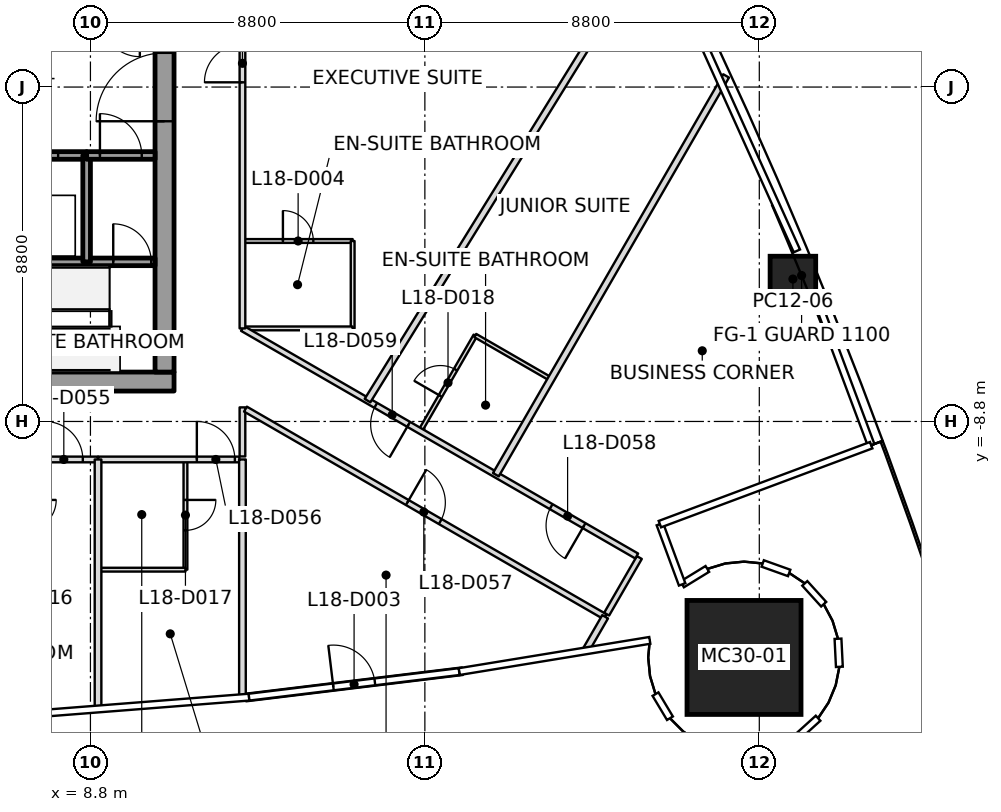
"""IFC4 building model, lengths in metres.
Left out: names, types, materials, properties, quantities, classifications, styles, units other than length and angle.
Written with IfcOpenShell. Run it as: python <this file> out.ifc"""

import sys

from ifc_helpers import new_model, si_unit, direction, frame, frame_2d, origin, origin_2d, place, context, subcontext, project, spatial, rectangle, extrude, element, fill, save


model = new_model("IFC4")
c1 = context("Model", 3, precision=1e-05, world=origin(), true_north=direction((0.0, 1.0)))
c2 = subcontext(c1, "Body", "Model", "MODEL_VIEW")
j1 = project(units=[si_unit("LENGTHUNIT", "METRE"), si_unit("PLANEANGLEUNIT", "RADIAN")], contexts=[c1])
p1 = place(None, origin())
s1 = spatial("IfcSite", under=j1, at=p1, CompositionType="ELEMENT")
p2 = place(p1, origin())
s2 = spatial("IfcBuilding", under=s1, at=p2, CompositionType="ELEMENT")
p3 = place(p2, frame((0.0, 0.0, 88.7)))
s3 = spatial("IfcBuildingStorey", under=s2, at=p3, CompositionType="ELEMENT", Elevation=88.7)
p4 = place(p3, frame((25.998, -15.01, 0.0), z_axis=(-0.030466109479, 0.017607037296, 0.999380712447), x_axis=(0.999535800346, 0.000536667047, 0.03046138236)))
e1 = element("IfcColumn", 1, at=p4, inside=s3, PredefinedType="COLUMN", context=c2, shape_type="SweptSolid", body=[
    extrude(rectangle(XDim=3.0, YDim=3.0, at=origin_2d()), origin(), (0.0, 0.0, 1.0), 3.702),
])
p5 = place(p3, frame((27.284, -5.052, 0.0), z_axis=(-0.019460669214, 0.010950749456, 0.999750650632), x_axis=(-0.380819123517, 0.924483192548, -0.017539152187)))
e2 = element("IfcColumn", 2, at=p5, inside=s3, PredefinedType="COLUMN", context=c2, shape_type="SweptSolid", body=[
    extrude(rectangle(XDim=1.2, YDim=1.2, at=origin_2d()), origin(), (0.0, 0.0, 1.0), 3.701),
])
p6 = place(p3, frame((-11.0, -7.75, 0.0), z_axis=(0.0, 0.0, 1.0), x_axis=(1.0, 0.0, 0.0)))
e3 = element("IfcWall", 3, at=p6, inside=s3, PredefinedType="SHEAR", context=c2, shape_type="SweptSolid", body=[
    extrude(rectangle(XDim=22.0, YDim=0.5, at=frame_2d((11.0, 0.0))), origin(), (0.0, 0.0, 1.0), 3.7),
])
p7 = place(p6, frame((10.45, 0.0, 0.0)))
e4 = element("IfcOpeningElement", 4, at=p7, cuts=e3, PredefinedType="OPENING", context=c2, shape_type="SweptSolid", body=[
    extrude(rectangle(XDim=1.1, YDim=2.1, at=frame_2d((0.55, 1.05))), frame((0.0, 0.25, 0.0), z_axis=(0.0, -1.0, 0.0), x_axis=(1.0, 0.0, 0.0)), (0.0, 0.0, 1.0), 0.5),
])
p8 = place(p3, frame((10.75, -7.5, 0.0), z_axis=(0.0, 0.0, 1.0), x_axis=(0.0, 1.0, 0.0)))
e5 = element("IfcWall", 5, at=p8, inside=s3, PredefinedType="SHEAR", context=c2, shape_type="SweptSolid", body=[
    extrude(rectangle(XDim=15.0, YDim=0.5, at=frame_2d((7.5, 0.0))), origin(), (0.0, 0.0, 1.0), 3.7),
])
p9 = place(p8, frame((6.6, 0.0, 0.0)))
e6 = element("IfcOpeningElement", 6, at=p9, cuts=e5, PredefinedType="OPENING", context=c2, shape_type="SweptSolid", body=[
    extrude(rectangle(XDim=1.8, YDim=2.1, at=frame_2d((0.9, 1.05))), frame((0.0, 0.25, 0.0), z_axis=(0.0, -1.0, 0.0), x_axis=(1.0, 0.0, 0.0)), (0.0, 0.0, 1.0), 0.5),
])
p10 = place(p3, frame((12.884, -16.065, 0.0), z_axis=(0.0, 0.0, 1.0), x_axis=(0.992689748885, 0.12069408626, 0.0)))
e7 = element("IfcWall", 7, at=p10, inside=s3, PredefinedType="SOLIDWALL", context=c2, shape_type="SweptSolid", body=[
    extrude(rectangle(XDim=5.749, YDim=0.2, at=frame_2d((2.875, 0.0))), origin(), (0.0, 0.0, 1.0), 3.04),
])
p11 = place(p10, frame((2.324, 0.0, 0.0)))
e8 = element("IfcOpeningElement", 8, at=p11, cuts=e7, PredefinedType="OPENING", context=c2, shape_type="SweptSolid", body=[
    extrude(rectangle(XDim=1.1, YDim=2.1, at=frame_2d((0.55, 1.05))), frame((0.0, 0.1, 0.0), z_axis=(0.0, -1.0, 0.0), x_axis=(1.0, 0.0, 0.0)), (0.0, 0.0, 1.0), 0.2),
])
p12 = place(p3, frame((6.1, -4.6, 0.0), z_axis=(0.0, 0.0, 1.0), x_axis=(1.0, 0.0, 0.0)))
e9 = element("IfcWall", 9, at=p12, inside=s3, PredefinedType="SOLIDWALL", context=c2, shape_type="SweptSolid", body=[
    extrude(rectangle(XDim=2.6, YDim=0.2, at=frame_2d((1.3, 0.0))), origin(), (0.0, 0.0, 1.0), 3.55),
])
p13 = place(p3, frame((6.1, -1.8, 0.0), z_axis=(0.0, 0.0, 1.0), x_axis=(1.0, 0.0, 0.0)))
e10 = element("IfcWall", 10, at=p13, inside=s3, PredefinedType="SOLIDWALL", context=c2, shape_type="SweptSolid", body=[
    extrude(rectangle(XDim=2.6, YDim=0.2, at=frame_2d((1.3, 0.0))), origin(), (0.0, 0.0, 1.0), 3.55),
])
p14 = place(p13, frame((0.75, 0.0, 0.0)))
e11 = element("IfcOpeningElement", 11, at=p14, cuts=e10, PredefinedType="OPENING", context=c2, shape_type="SweptSolid", body=[
    extrude(rectangle(XDim=1.1, YDim=2.1, at=frame_2d((0.55, 1.05))), frame((0.0, 0.1, 0.0), z_axis=(0.0, -1.0, 0.0), x_axis=(1.0, 0.0, 0.0)), (0.0, 0.0, 1.0), 0.2),
])
p15 = place(p3, frame((8.7, -4.6, 0.0), z_axis=(0.0, 0.0, 1.0), x_axis=(1.0, 0.0, 0.0)))
e12 = element("IfcWall", 12, at=p15, inside=s3, PredefinedType="SOLIDWALL", context=c2, shape_type="SweptSolid", body=[
    extrude(rectangle(XDim=1.8, YDim=0.2, at=frame_2d((0.9, 0.0))), origin(), (0.0, 0.0, 1.0), 3.55),
])
p16 = place(p15, frame((0.7, 0.0, 0.0)))
e13 = element("IfcOpeningElement", 13, at=p16, cuts=e12, PredefinedType="OPENING", context=c2, shape_type="SweptSolid", body=[
    extrude(rectangle(XDim=1.0, YDim=2.1, at=frame_2d((0.5, 1.05))), frame((0.0, 0.1, 0.0), z_axis=(0.0, -1.0, 0.0), x_axis=(1.0, 0.0, 0.0)), (0.0, 0.0, 1.0), 0.2),
])
p17 = place(p3, frame((8.7, -1.8, 0.0), z_axis=(0.0, 0.0, 1.0), x_axis=(0.0, -1.0, 0.0)))
e14 = element("IfcWall", 14, at=p17, inside=s3, PredefinedType="SOLIDWALL", context=c2, shape_type="SweptSolid", body=[
    extrude(rectangle(XDim=2.8, YDim=0.2, at=frame_2d((1.4, 0.0))), origin(), (0.0, 0.0, 1.0), 3.55),
])
p18 = place(p3, frame((8.7, -1.8, 0.0), z_axis=(0.0, 0.0, 1.0), x_axis=(1.0, 0.0, 0.0)))
e15 = element("IfcWall", 15, at=p18, inside=s3, PredefinedType="SOLIDWALL", context=c2, shape_type="SweptSolid", body=[
    extrude(rectangle(XDim=1.8, YDim=0.2, at=frame_2d((0.9, 0.0))), origin(), (0.0, 0.0, 1.0), 3.55),
])
p19 = place(p18, frame((0.35, 0.0, 0.0)))
e16 = element("IfcOpeningElement", 16, at=p19, cuts=e15, PredefinedType="OPENING", context=c2, shape_type="SweptSolid", body=[
    extrude(rectangle(XDim=1.1, YDim=2.1, at=frame_2d((0.55, 1.05))), frame((0.0, 0.1, 0.0), z_axis=(0.0, -1.0, 0.0), x_axis=(1.0, 0.0, 0.0)), (0.0, 0.0, 1.0), 0.2),
])
p20 = place(p3, frame((9.0, -9.8, 0.0), z_axis=(0.0, 0.0, 1.0), x_axis=(0.0, -1.0, 0.0)))
e17 = element("IfcWall", 17, at=p20, inside=s3, PredefinedType="PARTITIONING", context=c2, shape_type="SweptSolid", body=[
    extrude(rectangle(XDim=6.589, YDim=0.175, at=frame_2d((3.294, 0.0))), origin(), (0.0, 0.0, 1.0), 3.15),
])
p21 = place(p3, frame((12.8, -9.8, 0.0), z_axis=(0.0, 0.0, 1.0), x_axis=(0.0, -1.0, 0.0)))
e18 = element("IfcWall", 18, at=p21, inside=s3, PredefinedType="PARTITIONING", context=c2, shape_type="SweptSolid", body=[
    extrude(rectangle(XDim=6.271, YDim=0.175, at=frame_2d((3.135, 0.0))), origin(), (0.0, 0.0, 1.0), 3.15),
])
p22 = place(p3, frame((23.572, 3.843, 0.0), z_axis=(0.0, 0.0, 1.0), x_axis=(-0.526072077188, -0.850439985891, 0.0)))
e19 = element("IfcWall", 19, at=p22, inside=s3, PredefinedType="PARTITIONING", context=c2, shape_type="SweptSolid", body=[
    extrude(rectangle(XDim=14.221, YDim=0.175, at=frame_2d((7.11, 0.0))), origin(), (0.0, 0.0, 1.0), 2.947),
])
p23 = place(p3, frame((25.527, 0.293, 0.0), z_axis=(0.0, 0.0, 1.0), x_axis=(-0.499987549055, -0.866032592222, 0.0)))
e20 = element("IfcWall", 20, at=p23, inside=s3, PredefinedType="PARTITIONING", context=c2, shape_type="SweptSolid", body=[
    extrude(rectangle(XDim=12.117, YDim=0.175, at=frame_2d((6.059, 0.0))), origin(), (0.0, 0.0, 1.0), 2.934),
])
p24 = place(p3, frame((22.344, -13.939, 0.0), z_axis=(0.0, 0.0, 1.0), x_axis=(-0.499980071345, -0.866036909293, 0.0)))
e21 = element("IfcWall", 21, at=p24, inside=s3, PredefinedType="PARTITIONING", context=c2, shape_type="SweptSolid", body=[
    extrude(rectangle(XDim=1.066, YDim=0.175, at=frame_2d((0.533, 0.0))), origin(), (0.0, 0.0, 1.0), 3.15),
])
p25 = place(p3, frame((5.1, -9.8, 0.0), z_axis=(0.0, 0.0, 1.0), x_axis=(1.0, 0.0, 0.0)))
e22 = element("IfcWall", 22, at=p25, inside=s3, PredefinedType="PARTITIONING", context=c2, shape_type="SweptSolid", body=[
    extrude(rectangle(XDim=3.9, YDim=0.15, at=frame_2d((1.95, 0.0))), origin(), (0.0, 0.0, 1.0), 3.15),
])
p26 = place(p25, frame((2.5, 0.0, 0.0)))
e23 = element("IfcOpeningElement", 23, at=p26, cuts=e22, PredefinedType="OPENING", context=c2, shape_type="SweptSolid", body=[
    extrude(rectangle(XDim=1.0, YDim=2.1, at=frame_2d((0.5, 1.05))), frame((0.0, 0.075, 0.0), z_axis=(0.0, -1.0, 0.0), x_axis=(1.0, 0.0, 0.0)), (0.0, 0.0, 1.0), 0.15),
])
p27 = place(p3, frame((9.0, -9.8, 0.0), z_axis=(0.0, 0.0, 1.0), x_axis=(1.0, 0.0, 0.0)))
e24 = element("IfcWall", 24, at=p27, inside=s3, PredefinedType="PARTITIONING", context=c2, shape_type="SweptSolid", body=[
    extrude(rectangle(XDim=3.72, YDim=0.15, at=frame_2d((1.86, 0.0))), origin(), (0.0, 0.0, 1.0), 3.017),
])
p28 = place(p27, frame((2.6, 0.0, 0.0)))
e25 = element("IfcOpeningElement", 25, at=p28, cuts=e24, PredefinedType="OPENING", context=c2, shape_type="SweptSolid", body=[
    extrude(rectangle(XDim=1.0, YDim=2.1, at=frame_2d((0.5, 1.05))), frame((0.0, 0.075, 0.0), z_axis=(0.0, -1.0, 0.0), x_axis=(1.0, 0.0, 0.0)), (0.0, 0.0, 1.0), 0.15),
])
p29 = place(p3, frame((12.8, -9.72, 0.0), z_axis=(0.0, 0.0, 1.0), x_axis=(0.0, 1.0, 0.0)))
e26 = element("IfcWall", 26, at=p29, inside=s3, PredefinedType="PARTITIONING", context=c2, shape_type="SweptSolid", body=[
    extrude(rectangle(XDim=1.291, YDim=0.15, at=frame_2d((0.646, 0.0))), origin(), (0.0, 0.0, 1.0), 2.797),
])
p30 = place(p3, frame((12.879, -8.475, 0.0), z_axis=(0.0, 0.0, 1.0), x_axis=(0.866025241123, -0.500000281738, 0.0)))
e27 = element("IfcWall", 27, at=p30, inside=s3, PredefinedType="PARTITIONING", context=c2, shape_type="SweptSolid", body=[
    extrude(rectangle(XDim=10.928, YDim=0.15, at=frame_2d((5.464, 0.0))), origin(), (0.0, 0.0, 1.0), 2.797),
])
p31 = place(p30, frame((4.918, 0.0, 0.0)))
e28 = element("IfcOpeningElement", 28, at=p31, cuts=e27, PredefinedType="OPENING", context=c2, shape_type="SweptSolid", body=[
    extrude(rectangle(XDim=1.0, YDim=2.1, at=frame_2d((0.5, 1.05))), frame((0.0, 0.075, 0.0), z_axis=(0.0, -1.0, 0.0), x_axis=(1.0, 0.0, 0.0)), (0.0, 0.0, 1.0), 0.15),
])
p32 = place(p3, frame((22.384, -13.87, 0.0), z_axis=(0.0, 0.0, 1.0), x_axis=(0.499894466757, 0.866086324858, 0.0)))
e29 = element("IfcWall", 29, at=p32, inside=s3, PredefinedType="PARTITIONING", context=c2, shape_type="SweptSolid", body=[
    extrude(rectangle(XDim=1.72, YDim=0.15, at=frame_2d((0.86, 0.0))), origin(), (0.0, 0.0, 1.0), 2.797),
])
p33 = place(p3, frame((23.174, -12.34, 0.0), z_axis=(0.0, 0.0, 1.0), x_axis=(-0.866028448298, 0.49999472671, 0.0)))
e30 = element("IfcWall", 30, at=p33, inside=s3, PredefinedType="PARTITIONING", context=c2, shape_type="SweptSolid", body=[
    extrude(rectangle(XDim=11.979, YDim=0.15, at=frame_2d((5.99, 0.0))), origin(), (0.0, 0.0, 1.0), 2.947),
])
p34 = place(p33, frame((1.6, 0.0, 0.0)))
e31 = element("IfcOpeningElement", 31, at=p34, cuts=e30, PredefinedType="OPENING", context=c2, shape_type="SweptSolid", body=[
    extrude(rectangle(XDim=1.0, YDim=2.1, at=frame_2d((0.5, 1.05))), frame((0.0, 0.075, 0.0), z_axis=(0.0, -1.0, 0.0), x_axis=(1.0, 0.0, 0.0)), (0.0, 0.0, 1.0), 0.15),
])
p35 = place(p33, frame((6.929, 0.0, 0.0)))
e32 = element("IfcOpeningElement", 32, at=p35, cuts=e30, PredefinedType="OPENING", context=c2, shape_type="SweptSolid", body=[
    extrude(rectangle(XDim=1.0, YDim=2.1, at=frame_2d((0.5, 1.05))), frame((0.0, 0.075, 0.0), z_axis=(0.0, -1.0, 0.0), x_axis=(1.0, 0.0, 0.0)), (0.0, 0.0, 1.0), 0.15),
])
p36 = place(p3, frame((12.8, -6.351, 0.0), z_axis=(0.0, 0.0, 1.0), x_axis=(0.0, 1.0, 0.0)))
e33 = element("IfcWall", 33, at=p36, inside=s3, PredefinedType="PARTITIONING", context=c2, shape_type="SweptSolid", body=[
    extrude(rectangle(XDim=16.071, YDim=0.15, at=frame_2d((8.035, 0.0))), origin(), (0.0, 0.0, 1.0), 2.947),
])
p37 = place(p36, frame((6.476, 0.0, 0.0)))
e34 = element("IfcOpeningElement", 34, at=p37, cuts=e33, PredefinedType="OPENING", context=c2, shape_type="SweptSolid", body=[
    extrude(rectangle(XDim=1.0, YDim=2.1, at=frame_2d((0.5, 1.05))), frame((0.0, 0.075, 0.0), z_axis=(0.0, -1.0, 0.0), x_axis=(1.0, 0.0, 0.0)), (0.0, 0.0, 1.0), 0.15),
])
p38 = place(p36, frame((13.351, 0.0, 0.0)))
e35 = element("IfcOpeningElement", 35, at=p38, cuts=e33, PredefinedType="OPENING", context=c2, shape_type="SweptSolid", body=[
    extrude(rectangle(XDim=1.0, YDim=2.1, at=frame_2d((0.5, 1.05))), frame((0.0, 0.075, 0.0), z_axis=(0.0, -1.0, 0.0), x_axis=(1.0, 0.0, 0.0)), (0.0, 0.0, 1.0), 0.15),
])
p39 = place(p3, frame((11.3, -9.83, 0.0), z_axis=(0.0, 0.0, 1.0), x_axis=(0.0, -1.0, 0.0)))
e36 = element("IfcWall", 36, at=p39, inside=s3, PredefinedType="PARTITIONING", context=c2, shape_type="SweptSolid", body=[
    extrude(rectangle(XDim=2.87, YDim=0.1, at=frame_2d((1.435, 0.0))), origin(), (0.0, 0.0, 1.0), 3.017),
])
p40 = place(p39, frame((1.035, 0.0, 0.0)))
e37 = element("IfcOpeningElement", 37, at=p40, cuts=e36, PredefinedType="OPENING", context=c2, shape_type="SweptSolid", body=[
    extrude(rectangle(XDim=0.8, YDim=2.1, at=frame_2d((0.4, 1.05))), frame((0.0, 0.05, 0.0), z_axis=(0.0, -1.0, 0.0), x_axis=(1.0, 0.0, 0.0)), (0.0, 0.0, 1.0), 0.1),
])
p41 = place(p3, frame((11.3, -12.7, 0.0), z_axis=(0.0, 0.0, 1.0), x_axis=(-1.0, 0.0, 0.0)))
e38 = element("IfcWall", 38, at=p41, inside=s3, PredefinedType="PARTITIONING", context=c2, shape_type="SweptSolid", body=[
    extrude(rectangle(XDim=2.27, YDim=0.1, at=frame_2d((1.135, 0.0))), origin(), (0.0, 0.0, 1.0), 3.017),
])
p42 = place(p3, frame((12.83, -4.051, 0.0), z_axis=(0.0, 0.0, 1.0), x_axis=(1.0, 0.0, 0.0)))
e39 = element("IfcWall", 39, at=p42, inside=s3, PredefinedType="PARTITIONING", context=c2, shape_type="SweptSolid", body=[
    extrude(rectangle(XDim=2.87, YDim=0.1, at=frame_2d((1.435, 0.0))), origin(), (0.0, 0.0, 1.0), 2.947),
])
p43 = place(p42, frame((1.035, 0.0, 0.0)))
e40 = element("IfcOpeningElement", 40, at=p43, cuts=e39, PredefinedType="OPENING", context=c2, shape_type="SweptSolid", body=[
    extrude(rectangle(XDim=0.8, YDim=2.1, at=frame_2d((0.4, 1.05))), frame((0.0, 0.05, 0.0), z_axis=(0.0, -1.0, 0.0), x_axis=(1.0, 0.0, 0.0)), (0.0, 0.0, 1.0), 0.1),
])
p44 = place(p3, frame((15.7, -4.051, 0.0), z_axis=(0.0, 0.0, 1.0), x_axis=(0.0, -1.0, 0.0)))
e41 = element("IfcWall", 41, at=p44, inside=s3, PredefinedType="PARTITIONING", context=c2, shape_type="SweptSolid", body=[
    extrude(rectangle(XDim=2.3, YDim=0.1, at=frame_2d((1.15, 0.0))), origin(), (0.0, 0.0, 1.0), 2.947),
])
p45 = place(p3, frame((15.7, -6.351, 0.0), z_axis=(0.0, 0.0, 1.0), x_axis=(-1.0, 0.0, 0.0)))
e42 = element("IfcWall", 42, at=p45, inside=s3, PredefinedType="PARTITIONING", context=c2, shape_type="SweptSolid", body=[
    extrude(rectangle(XDim=2.84, YDim=0.1, at=frame_2d((1.42, 0.0))), origin(), (0.0, 0.0, 1.0), 3.15),
])
p46 = place(p3, frame((17.491, -9.025, 0.0), z_axis=(0.0, 0.0, 1.0), x_axis=(0.499999802827, 0.866025517622, 0.0)))
e43 = element("IfcWall", 43, at=p46, inside=s3, PredefinedType="PARTITIONING", context=c2, shape_type="SweptSolid", body=[
    extrude(rectangle(XDim=2.87, YDim=0.1, at=frame_2d((1.435, 0.0))), origin(), (0.0, 0.0, 1.0), 3.15),
])
p47 = place(p46, frame((1.035, 0.0, 0.0)))
e44 = element("IfcOpeningElement", 44, at=p47, cuts=e43, PredefinedType="OPENING", context=c2, shape_type="SweptSolid", body=[
    extrude(rectangle(XDim=0.8, YDim=2.1, at=frame_2d((0.4, 1.05))), frame((0.0, 0.05, 0.0), z_axis=(0.0, -1.0, 0.0), x_axis=(1.0, 0.0, 0.0)), (0.0, 0.0, 1.0), 0.1),
])
p48 = place(p3, frame((18.927, -6.539, 0.0), z_axis=(0.0, 0.0, 1.0), x_axis=(0.866017224141, -0.500014167291, 0.0)))
e45 = element("IfcWall", 45, at=p48, inside=s3, PredefinedType="PARTITIONING", context=c2, shape_type="SweptSolid", body=[
    extrude(rectangle(XDim=2.27, YDim=0.1, at=frame_2d((1.135, 0.0))), origin(), (0.0, 0.0, 1.0), 3.15),
])
p49 = place(p11, origin())
e46 = element("IfcDoor", 46, at=p49, inside=s3, OperationType="SINGLE_SWING_RIGHT", PredefinedType="DOOR", context=c2, shape_type="SweptSolid", body=[
    extrude(rectangle(XDim=1.1, YDim=2.1, at=frame_2d((0.55, 1.05))), frame((0.0, 0.025, 0.0), z_axis=(0.0, -1.0, 0.0), x_axis=(1.0, 0.0, 0.0)), (0.0, 0.0, 1.0), 0.05),
])
fill(e8, e46)
p50 = place(p37, origin())
e47 = element("IfcDoor", 47, at=p50, inside=s3, OperationType="SINGLE_SWING_LEFT", PredefinedType="DOOR", context=c2, shape_type="SweptSolid", body=[
    extrude(rectangle(XDim=1.0, YDim=2.1, at=frame_2d((0.5, 1.05))), frame((0.0, 0.025, 0.0), z_axis=(0.0, -1.0, 0.0), x_axis=(1.0, 0.0, 0.0)), (0.0, 0.0, 1.0), 0.05),
])
fill(e34, e47)
p51 = place(p43, origin())
e48 = element("IfcDoor", 48, at=p51, inside=s3, OperationType="SINGLE_SWING_RIGHT", PredefinedType="DOOR", context=c2, shape_type="SweptSolid", body=[
    extrude(rectangle(XDim=0.8, YDim=2.1, at=frame_2d((0.4, 1.05))), frame((0.0, 0.025, 0.0), z_axis=(0.0, -1.0, 0.0), x_axis=(1.0, 0.0, 0.0)), (0.0, 0.0, 1.0), 0.05),
])
fill(e40, e48)
p52 = place(p26, origin())
e49 = element("IfcDoor", 49, at=p52, inside=s3, OperationType="SINGLE_SWING_LEFT", PredefinedType="DOOR", context=c2, shape_type="SweptSolid", body=[
    extrude(rectangle(XDim=1.0, YDim=2.1, at=frame_2d((0.5, 1.05))), frame((0.0, 0.025, 0.0), z_axis=(0.0, -1.0, 0.0), x_axis=(1.0, 0.0, 0.0)), (0.0, 0.0, 1.0), 0.05),
])
fill(e23, e49)
p53 = place(p28, origin())
e50 = element("IfcDoor", 50, at=p53, inside=s3, OperationType="SINGLE_SWING_LEFT", PredefinedType="DOOR", context=c2, shape_type="SweptSolid", body=[
    extrude(rectangle(XDim=1.0, YDim=2.1, at=frame_2d((0.5, 1.05))), frame((0.0, 0.025, 0.0), z_axis=(0.0, -1.0, 0.0), x_axis=(1.0, 0.0, 0.0)), (0.0, 0.0, 1.0), 0.05),
])
fill(e25, e50)
p54 = place(p40, origin())
e51 = element("IfcDoor", 51, at=p54, inside=s3, OperationType="SINGLE_SWING_RIGHT", PredefinedType="DOOR", context=c2, shape_type="SweptSolid", body=[
    extrude(rectangle(XDim=0.8, YDim=2.1, at=frame_2d((0.4, 1.05))), frame((0.0, 0.025, 0.0), z_axis=(0.0, -1.0, 0.0), x_axis=(1.0, 0.0, 0.0)), (0.0, 0.0, 1.0), 0.05),
])
fill(e37, e51)
p55 = place(p31, origin())
e52 = element("IfcDoor", 52, at=p55, inside=s3, OperationType="SINGLE_SWING_RIGHT", PredefinedType="DOOR", context=c2, shape_type="SweptSolid", body=[
    extrude(rectangle(XDim=1.0, YDim=2.1, at=frame_2d((0.5, 1.05))), frame((0.0, 0.025, 0.0), z_axis=(0.0, -1.0, 0.0), x_axis=(1.0, 0.0, 0.0)), (0.0, 0.0, 1.0), 0.05),
])
fill(e28, e52)
p56 = place(p34, origin())
e53 = element("IfcDoor", 53, at=p56, inside=s3, OperationType="SINGLE_SWING_LEFT", PredefinedType="DOOR", context=c2, shape_type="SweptSolid", body=[
    extrude(rectangle(XDim=1.0, YDim=2.1, at=frame_2d((0.5, 1.05))), frame((0.0, 0.025, 0.0), z_axis=(0.0, -1.0, 0.0), x_axis=(1.0, 0.0, 0.0)), (0.0, 0.0, 1.0), 0.05),
])
fill(e31, e53)
p57 = place(p35, origin())
e54 = element("IfcDoor", 54, at=p57, inside=s3, OperationType="SINGLE_SWING_LEFT", PredefinedType="DOOR", context=c2, shape_type="SweptSolid", body=[
    extrude(rectangle(XDim=1.0, YDim=2.1, at=frame_2d((0.5, 1.05))), frame((0.0, 0.025, 0.0), z_axis=(0.0, -1.0, 0.0), x_axis=(1.0, 0.0, 0.0)), (0.0, 0.0, 1.0), 0.05),
])
fill(e32, e54)
p58 = place(p47, origin())
e55 = element("IfcDoor", 55, at=p58, inside=s3, OperationType="SINGLE_SWING_RIGHT", PredefinedType="DOOR", context=c2, shape_type="SweptSolid", body=[
    extrude(rectangle(XDim=0.8, YDim=2.1, at=frame_2d((0.4, 1.05))), frame((0.0, 0.025, 0.0), z_axis=(0.0, -1.0, 0.0), x_axis=(1.0, 0.0, 0.0)), (0.0, 0.0, 1.0), 0.05),
])
fill(e44, e55)
p59 = place(p14, origin())
e56 = element("IfcDoor", 56, at=p59, inside=s3, OperationType="SLIDING_TO_LEFT", PredefinedType="DOOR", context=c2, shape_type="SweptSolid", body=[
    extrude(rectangle(XDim=1.1, YDim=2.1, at=frame_2d((0.55, 1.05))), frame((0.0, 0.025, 0.0), z_axis=(0.0, -1.0, 0.0), x_axis=(1.0, 0.0, 0.0)), (0.0, 0.0, 1.0), 0.05),
])
fill(e11, e56)
p60 = place(p19, origin())
e57 = element("IfcDoor", 57, at=p60, inside=s3, OperationType="SINGLE_SWING_RIGHT", PredefinedType="DOOR", context=c2, shape_type="SweptSolid", body=[
    extrude(rectangle(XDim=1.1, YDim=2.1, at=frame_2d((0.55, 1.05))), frame((0.0, 0.025, 0.0), z_axis=(0.0, -1.0, 0.0), x_axis=(1.0, 0.0, 0.0)), (0.0, 0.0, 1.0), 0.05),
])
fill(e16, e57)
p61 = place(p16, origin())
e58 = element("IfcDoor", 58, at=p61, inside=s3, OperationType="SINGLE_SWING_RIGHT", PredefinedType="DOOR", context=c2, shape_type="SweptSolid", body=[
    extrude(rectangle(XDim=1.0, YDim=2.1, at=frame_2d((0.5, 1.05))), frame((0.0, 0.025, 0.0), z_axis=(0.0, -1.0, 0.0), x_axis=(1.0, 0.0, 0.0)), (0.0, 0.0, 1.0), 0.05),
])
fill(e13, e58)
p62 = place(p9, origin())
e59 = element("IfcDoor", 59, at=p62, inside=s3, OperationType="DOUBLE_DOOR_SINGLE_SWING", PredefinedType="DOOR", context=c2, shape_type="SweptSolid", body=[
    extrude(rectangle(XDim=1.8, YDim=2.1, at=frame_2d((0.9, 1.05))), frame((0.0, 0.025, 0.0), z_axis=(0.0, -1.0, 0.0), x_axis=(1.0, 0.0, 0.0)), (0.0, 0.0, 1.0), 0.05),
])
fill(e6, e59)
save(model, sys.argv[1])
